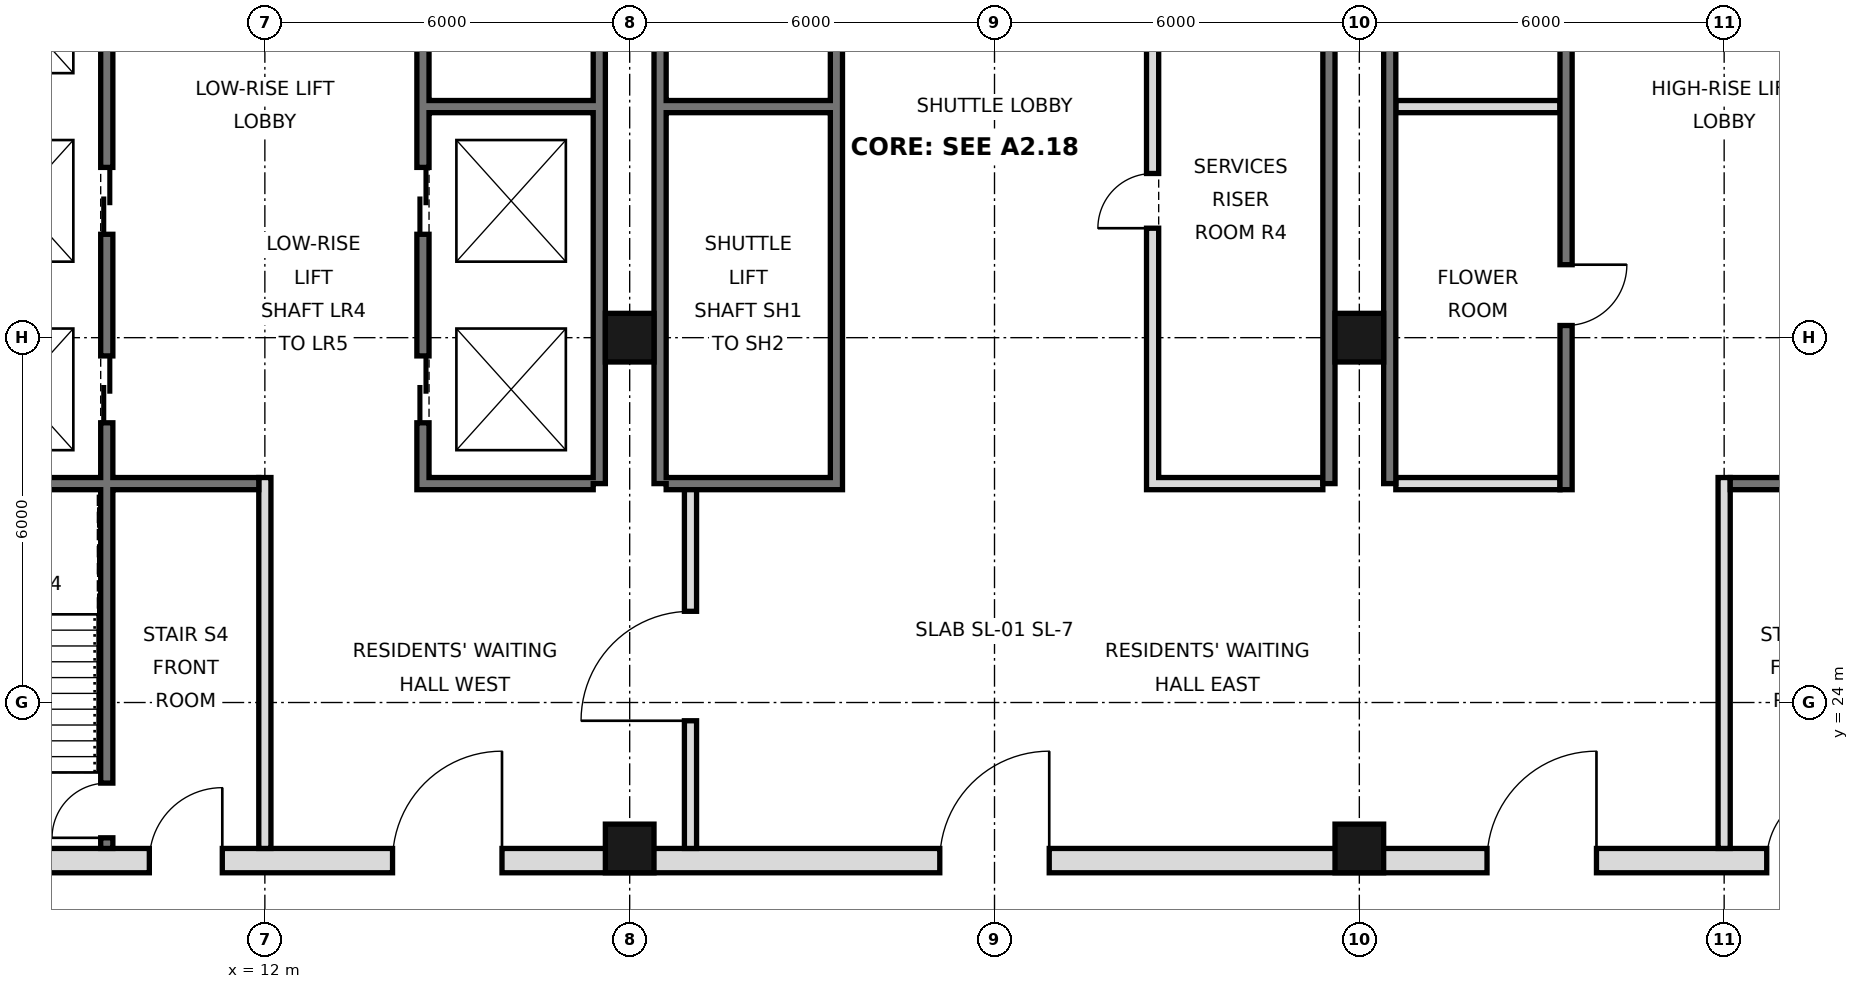
"""IFC4 building model, lengths in metres.
Left out: names, types, materials, properties, quantities, classifications, styles, units other than length and angle.
Written with IfcOpenShell. Run it as: python <this file> out.ifc"""

import sys

from ifc_helpers import new_model, si_unit, direction, frame, frame_2d, origin, origin_2d, place, context, subcontext, project, spatial, rectangle, hollow_rectangle, extrude, element, fill, save


model = new_model("IFC4")
c1 = context("Model", 3, precision=1e-05, world=origin(), true_north=direction((0.0, 1.0)))
c2 = subcontext(c1, "Body", "Model", "MODEL_VIEW")
j1 = project(units=[si_unit("LENGTHUNIT", "METRE"), si_unit("PLANEANGLEUNIT", "RADIAN")], contexts=[c1])
p1 = place(None, origin())
s1 = spatial("IfcSite", under=j1, at=p1, CompositionType="ELEMENT")
p2 = place(p1, origin())
s2 = spatial("IfcBuilding", under=s1, at=p2, CompositionType="ELEMENT")
p3 = place(p2, frame((0.0, 0.0, 71.4)))
s3 = spatial("IfcBuildingStorey", under=s2, at=p3, CompositionType="ELEMENT", Elevation=71.4)
for number, where, z_axis, x_axis in (
    (1, (18.0, 21.6, 0.0), (0.0, 0.0, 1.0), (1.0, 0.0, 0.0)),
    (2, (18.0, 30.0, 0.0), (0.0, 0.0, 1.0), (1.0, 0.0, 0.0)),
    (3, (30.0, 21.6, 0.0), (0.0, 0.0, 1.0), (1.0, 0.0, 0.0)),
    (4, (30.0, 30.0, 0.0), (0.0, 0.0, 1.0), (1.0, 0.0, 0.0)),
):
    element("IfcColumn", number, at=place(p3, frame(where, z_axis=z_axis, x_axis=x_axis)), inside=s3, PredefinedType="COLUMN", context=c2, shape_type="SweptSolid", body=[
        extrude(hollow_rectangle(XDim=0.8, YDim=0.8, WallThickness=0.06, at=origin_2d()), origin(), (0.0, 0.0, 1.0), 3.6),
    ])
for number, where, z_axis, x_axis in (
    (5, (17.5, 27.6, 0.0), (0.0, 0.0, 1.0), (0.0, 1.0, 0.0)),
    (6, (18.5, 27.6, 0.0), (0.0, 0.0, 1.0), (0.0, 1.0, 0.0)),
    (7, (29.5, 27.6, 0.0), (0.0, 0.0, 1.0), (0.0, 1.0, 0.0)),
    (8, (30.5, 27.6, 0.0), (0.0, 0.0, 1.0), (0.0, 1.0, 0.0)),
):
    element("IfcWall", number, at=place(p3, frame(where, z_axis=z_axis, x_axis=x_axis)), inside=s3, PredefinedType="SOLIDWALL", context=c2, shape_type="SweptSolid", body=[
        extrude(rectangle(XDim=17.5, YDim=0.2, at=frame_2d((8.75, 0.0))), origin(), (0.0, 0.0, 1.0), 3.42),
    ])
p4 = place(p3, frame((5.6, 21.4, 0.0), z_axis=(0.0, 0.0, 1.0), x_axis=(1.0, 0.0, 0.0)))
e9 = element("IfcWall", 9, at=p4, inside=s3, PredefinedType="SOLIDWALL", context=c2, shape_type="SweptSolid", body=[
    extrude(rectangle(XDim=36.8, YDim=0.4, at=frame_2d((18.4, 0.0))), origin(), (0.0, 0.0, 1.0), 3.42),
])
p5 = place(p4, frame((8.5, 0.0, 0.0)))
e10 = element("IfcOpeningElement", 10, at=p5, cuts=e9, PredefinedType="OPENING", context=c2, shape_type="SweptSolid", body=[
    extrude(rectangle(XDim=1.8, YDim=2.1, at=frame_2d((0.9, 1.05))), frame((0.0, 0.21, 0.0), z_axis=(0.0, -1.0, 0.0), x_axis=(1.0, 0.0, 0.0)), (0.0, 0.0, 1.0), 0.42),
])
p6 = place(p4, frame((17.5, 0.0, 0.0)))
e11 = element("IfcOpeningElement", 11, at=p6, cuts=e9, PredefinedType="OPENING", context=c2, shape_type="SweptSolid", body=[
    extrude(rectangle(XDim=1.8, YDim=2.1, at=frame_2d((0.9, 1.05))), frame((0.0, 0.21, 0.0), z_axis=(0.0, -1.0, 0.0), x_axis=(1.0, 0.0, 0.0)), (0.0, 0.0, 1.0), 0.42),
])
p7 = place(p4, frame((26.5, 0.0, 0.0)))
e12 = element("IfcOpeningElement", 12, at=p7, cuts=e9, PredefinedType="OPENING", context=c2, shape_type="SweptSolid", body=[
    extrude(rectangle(XDim=1.8, YDim=2.1, at=frame_2d((0.9, 1.05))), frame((0.0, 0.21, 0.0), z_axis=(0.0, -1.0, 0.0), x_axis=(1.0, 0.0, 0.0)), (0.0, 0.0, 1.0), 0.42),
])
p8 = place(p4, frame((4.5, 0.0, 0.0)))
e13 = element("IfcOpeningElement", 13, at=p8, cuts=e9, PredefinedType="OPENING", context=c2, shape_type="SweptSolid", body=[
    extrude(rectangle(XDim=1.2, YDim=2.1, at=frame_2d((0.6, 1.05))), frame((0.0, 0.21, 0.0), z_axis=(0.0, -1.0, 0.0), x_axis=(1.0, 0.0, 0.0)), (0.0, 0.0, 1.0), 0.42),
])
p9 = place(p4, frame((31.1, 0.0, 0.0)))
e14 = element("IfcOpeningElement", 14, at=p9, cuts=e9, PredefinedType="OPENING", context=c2, shape_type="SweptSolid", body=[
    extrude(rectangle(XDim=1.2, YDim=2.1, at=frame_2d((0.6, 1.05))), frame((0.0, 0.21, 0.0), z_axis=(0.0, -1.0, 0.0), x_axis=(1.0, 0.0, 0.0)), (0.0, 0.0, 1.0), 0.42),
])
p10 = place(p3, frame((19.0, 21.6, 0.0), z_axis=(0.0, 0.0, 1.0), x_axis=(0.0, 1.0, 0.0)))
e15 = element("IfcWall", 15, at=p10, inside=s3, PredefinedType="PARTITIONING", context=c2, shape_type="SweptSolid", body=[
    extrude(rectangle(XDim=6.0, YDim=0.2, at=frame_2d((3.0, 0.0))), origin(), (0.0, 0.0, 1.0), 3.42),
])
p11 = place(p10, frame((2.1, 0.0, 0.0)))
e16 = element("IfcOpeningElement", 16, at=p11, cuts=e15, PredefinedType="OPENING", context=c2, shape_type="SweptSolid", body=[
    extrude(rectangle(XDim=1.8, YDim=2.1, at=frame_2d((0.9, 1.05))), frame((0.0, 0.11, 0.0), z_axis=(0.0, -1.0, 0.0), x_axis=(1.0, 0.0, 0.0)), (0.0, 0.0, 1.0), 0.22),
])
p12 = place(p3, frame((12.0, 21.6, 0.0), z_axis=(0.0, 0.0, 1.0), x_axis=(0.0, 1.0, 0.0)))
e17 = element("IfcWall", 17, at=p12, inside=s3, PredefinedType="PARTITIONING", context=c2, shape_type="SweptSolid", body=[
    extrude(rectangle(XDim=6.1, YDim=0.2, at=frame_2d((3.05, 0.0))), origin(), (0.0, 0.0, 1.0), 3.42),
])
p13 = place(p3, frame((14.6, 27.5, 0.0), z_axis=(0.0, 0.0, 1.0), x_axis=(0.0, 1.0, 0.0)))
e18 = element("IfcWall", 18, at=p13, inside=s3, PredefinedType="SOLIDWALL", context=c2, shape_type="SweptSolid", body=[
    extrude(rectangle(XDim=17.5, YDim=0.2, at=frame_2d((8.75, 0.0))), origin(), (0.0, 0.0, 1.0), 3.42),
])
p14 = place(p13, frame((1.1, 0.0, 0.0)))
e19 = element("IfcOpeningElement", 19, at=p14, cuts=e18, PredefinedType="OPENING", context=c2, shape_type="SweptSolid", body=[
    extrude(rectangle(XDim=1.1, YDim=2.1, at=frame_2d((0.55, 1.05))), frame((0.0, 0.11, 0.0), z_axis=(0.0, -1.0, 0.0), x_axis=(1.0, 0.0, 0.0)), (0.0, 0.0, 1.0), 0.22),
])
p15 = place(p13, frame((4.2, 0.0, 0.0)))
e20 = element("IfcOpeningElement", 20, at=p15, cuts=e18, PredefinedType="OPENING", context=c2, shape_type="SweptSolid", body=[
    extrude(rectangle(XDim=1.1, YDim=2.1, at=frame_2d((0.55, 1.05))), frame((0.0, 0.11, 0.0), z_axis=(0.0, -1.0, 0.0), x_axis=(1.0, 0.0, 0.0)), (0.0, 0.0, 1.0), 0.22),
])
p16 = place(p13, frame((15.4, 0.0, 0.0)))
e21 = element("IfcOpeningElement", 21, at=p16, cuts=e18, PredefinedType="OPENING", context=c2, shape_type="SweptSolid", body=[
    extrude(rectangle(XDim=1.1, YDim=2.1, at=frame_2d((0.55, 1.05))), frame((0.0, 0.11, 0.0), z_axis=(0.0, -1.0, 0.0), x_axis=(1.0, 0.0, 0.0)), (0.0, 0.0, 1.0), 0.22),
])
p17 = place(p13, frame((9.9, 0.0, 0.0)))
e22 = element("IfcOpeningElement", 22, at=p17, cuts=e18, PredefinedType="OPENING", context=c2, shape_type="SweptSolid", body=[
    extrude(rectangle(XDim=0.9, YDim=2.1, at=frame_2d((0.45, 1.05))), frame((0.0, 0.11, 0.0), z_axis=(0.0, -1.0, 0.0), x_axis=(1.0, 0.0, 0.0)), (0.0, 0.0, 1.0), 0.22),
])
p18 = place(p3, frame((21.4, 27.5, 0.0), z_axis=(0.0, 0.0, 1.0), x_axis=(0.0, 1.0, 0.0)))
e23 = element("IfcWall", 23, at=p18, inside=s3, PredefinedType="SOLIDWALL", context=c2, shape_type="SweptSolid", body=[
    extrude(rectangle(XDim=17.5, YDim=0.2, at=frame_2d((8.75, 0.0))), origin(), (0.0, 0.0, 1.0), 3.42),
])
p19 = place(p18, frame((9.8, 0.0, 0.0)))
e24 = element("IfcOpeningElement", 24, at=p19, cuts=e23, PredefinedType="OPENING", context=c2, shape_type="SweptSolid", body=[
    extrude(rectangle(XDim=1.0, YDim=2.1, at=frame_2d((0.5, 1.05))), frame((0.0, 0.11, 0.0), z_axis=(0.0, -1.0, 0.0), x_axis=(1.0, 0.0, 0.0)), (0.0, 0.0, 1.0), 0.22),
])
p20 = place(p18, frame((7.4, 0.0, 0.0)))
e25 = element("IfcOpeningElement", 25, at=p20, cuts=e23, PredefinedType="OPENING", context=c2, shape_type="SweptSolid", body=[
    extrude(rectangle(XDim=0.9, YDim=2.1, at=frame_2d((0.45, 1.05))), frame((0.0, 0.11, 0.0), z_axis=(0.0, -1.0, 0.0), x_axis=(1.0, 0.0, 0.0)), (0.0, 0.0, 1.0), 0.22),
])
p21 = place(p3, frame((26.6, 27.5, 0.0), z_axis=(0.0, 0.0, 1.0), x_axis=(0.0, 1.0, 0.0)))
e26 = element("IfcWall", 26, at=p21, inside=s3, PredefinedType="SOLIDWALL", context=c2, shape_type="SweptSolid", body=[
    extrude(rectangle(XDim=17.5, YDim=0.2, at=frame_2d((8.75, 0.0))), origin(), (0.0, 0.0, 1.0), 3.42),
])
p22 = place(p21, frame((4.3, 0.0, 0.0)))
e27 = element("IfcOpeningElement", 27, at=p22, cuts=e26, PredefinedType="OPENING", context=c2, shape_type="SweptSolid", body=[
    extrude(rectangle(XDim=0.9, YDim=2.1, at=frame_2d((0.45, 1.05))), frame((0.0, 0.11, 0.0), z_axis=(0.0, -1.0, 0.0), x_axis=(1.0, 0.0, 0.0)), (0.0, 0.0, 1.0), 0.22),
])
p23 = place(p21, frame((10.35, 0.0, 0.0)))
e28 = element("IfcOpeningElement", 28, at=p23, cuts=e26, PredefinedType="OPENING", context=c2, shape_type="SweptSolid", body=[
    extrude(rectangle(XDim=1.0, YDim=2.1, at=frame_2d((0.5, 1.05))), frame((0.0, 0.11, 0.0), z_axis=(0.0, -1.0, 0.0), x_axis=(1.0, 0.0, 0.0)), (0.0, 0.0, 1.0), 0.22),
])
p24 = place(p3, frame((33.4, 27.5, 0.0), z_axis=(0.0, 0.0, 1.0), x_axis=(0.0, 1.0, 0.0)))
e29 = element("IfcWall", 29, at=p24, inside=s3, PredefinedType="SOLIDWALL", context=c2, shape_type="SweptSolid", body=[
    extrude(rectangle(XDim=17.5, YDim=0.2, at=frame_2d((8.75, 0.0))), origin(), (0.0, 0.0, 1.0), 3.42),
])
p25 = place(p24, frame((15.4, 0.0, 0.0)))
e30 = element("IfcOpeningElement", 30, at=p25, cuts=e29, PredefinedType="OPENING", context=c2, shape_type="SweptSolid", body=[
    extrude(rectangle(XDim=1.1, YDim=2.1, at=frame_2d((0.55, 1.05))), frame((0.0, 0.11, 0.0), z_axis=(0.0, -1.0, 0.0), x_axis=(1.0, 0.0, 0.0)), (0.0, 0.0, 1.0), 0.22),
])
p26 = place(p24, frame((2.7, 0.0, 0.0)))
e31 = element("IfcOpeningElement", 31, at=p26, cuts=e29, PredefinedType="OPENING", context=c2, shape_type="SweptSolid", body=[
    extrude(rectangle(XDim=1.0, YDim=2.1, at=frame_2d((0.5, 1.05))), frame((0.0, 0.11, 0.0), z_axis=(0.0, -1.0, 0.0), x_axis=(1.0, 0.0, 0.0)), (0.0, 0.0, 1.0), 0.22),
])
p27 = place(p24, frame((9.9, 0.0, 0.0)))
e32 = element("IfcOpeningElement", 32, at=p27, cuts=e29, PredefinedType="OPENING", context=c2, shape_type="SweptSolid", body=[
    extrude(rectangle(XDim=0.9, YDim=2.1, at=frame_2d((0.45, 1.05))), frame((0.0, 0.11, 0.0), z_axis=(0.0, -1.0, 0.0), x_axis=(1.0, 0.0, 0.0)), (0.0, 0.0, 1.0), 0.22),
])
p28 = place(p3, frame((36.0, 21.6, 0.0), z_axis=(0.0, 0.0, 1.0), x_axis=(0.0, 1.0, 0.0)))
e33 = element("IfcWall", 33, at=p28, inside=s3, PredefinedType="PARTITIONING", context=c2, shape_type="SweptSolid", body=[
    extrude(rectangle(XDim=6.1, YDim=0.2, at=frame_2d((3.05, 0.0))), origin(), (0.0, 0.0, 1.0), 3.42),
])
p29 = place(p3, frame((9.4, 21.6, 0.0), z_axis=(0.0, 0.0, 1.0), x_axis=(0.0, 1.0, 0.0)))
e34 = element("IfcWall", 34, at=p29, inside=s3, PredefinedType="SOLIDWALL", context=c2, shape_type="SweptSolid", body=[
    extrude(rectangle(XDim=23.4, YDim=0.2, at=frame_2d((11.7, 0.0))), origin(), (0.0, 0.0, 1.0), 3.42),
])
p30 = place(p29, frame((7.0, 0.0, 0.0)))
e35 = element("IfcOpeningElement", 35, at=p30, cuts=e34, PredefinedType="OPENING", context=c2, shape_type="SweptSolid", body=[
    extrude(rectangle(XDim=1.1, YDim=2.1, at=frame_2d((0.55, 1.05))), frame((0.0, 0.11, 0.0), z_axis=(0.0, -1.0, 0.0), x_axis=(1.0, 0.0, 0.0)), (0.0, 0.0, 1.0), 0.22),
])
p31 = place(p29, frame((10.1, 0.0, 0.0)))
e36 = element("IfcOpeningElement", 36, at=p31, cuts=e34, PredefinedType="OPENING", context=c2, shape_type="SweptSolid", body=[
    extrude(rectangle(XDim=1.1, YDim=2.1, at=frame_2d((0.55, 1.05))), frame((0.0, 0.11, 0.0), z_axis=(0.0, -1.0, 0.0), x_axis=(1.0, 0.0, 0.0)), (0.0, 0.0, 1.0), 0.22),
])
p32 = place(p29, frame((13.2, 0.0, 0.0)))
e37 = element("IfcOpeningElement", 37, at=p32, cuts=e34, PredefinedType="OPENING", context=c2, shape_type="SweptSolid", body=[
    extrude(rectangle(XDim=1.1, YDim=2.1, at=frame_2d((0.55, 1.05))), frame((0.0, 0.11, 0.0), z_axis=(0.0, -1.0, 0.0), x_axis=(1.0, 0.0, 0.0)), (0.0, 0.0, 1.0), 0.22),
])
p33 = place(p29, frame((15.7, 0.0, 0.0)))
e38 = element("IfcOpeningElement", 38, at=p33, cuts=e34, PredefinedType="OPENING", context=c2, shape_type="SweptSolid", body=[
    extrude(rectangle(XDim=1.0, YDim=2.1, at=frame_2d((0.5, 1.05))), frame((0.0, 0.11, 0.0), z_axis=(0.0, -1.0, 0.0), x_axis=(1.0, 0.0, 0.0)), (0.0, 0.0, 1.0), 0.22),
])
p34 = place(p29, frame((0.175, 0.0, 0.0)))
e39 = element("IfcOpeningElement", 39, at=p34, cuts=e34, PredefinedType="OPENING", context=c2, shape_type="SweptSolid", body=[
    extrude(rectangle(XDim=0.9, YDim=2.1, at=frame_2d((0.45, 1.05))), frame((0.0, 0.11, 0.0), z_axis=(0.0, -1.0, 0.0), x_axis=(1.0, 0.0, 0.0)), (0.0, 0.0, 1.0), 0.22),
])
for number, where, z_axis, x_axis in (
    (40, (14.7, 27.6, 0.0), (0.0, 0.0, 1.0), (1.0, 0.0, 0.0)),
    (41, (18.6, 27.6, 0.0), (0.0, 0.0, 1.0), (1.0, 0.0, 0.0)),
    (42, (26.7, 27.6, 0.0), (0.0, 0.0, 1.0), (1.0, 0.0, 0.0)),
):
    element("IfcWall", number, at=place(p3, frame(where, z_axis=z_axis, x_axis=x_axis)), inside=s3, PredefinedType="SOLIDWALL", context=c2, shape_type="SweptSolid", body=[
        extrude(rectangle(XDim=2.7, YDim=0.2, at=frame_2d((1.35, 0.0))), origin(), (0.0, 0.0, 1.0), 3.42),
    ])
p35 = place(p3, frame((30.6, 27.6, 0.0), z_axis=(0.0, 0.0, 1.0), x_axis=(1.0, 0.0, 0.0)))
e43 = element("IfcWall", 43, at=p35, inside=s3, PredefinedType="PARTITIONING", context=c2, shape_type="SweptSolid", body=[
    extrude(rectangle(XDim=2.7, YDim=0.2, at=frame_2d((1.35, 0.0))), origin(), (0.0, 0.0, 1.0), 3.42),
])
for number, where, z_axis, x_axis in (
    (44, (36.1, 27.6, 0.0), (0.0, 0.0, 1.0), (1.0, 0.0, 0.0)),
    (45, (6.6, 27.6, 0.0), (0.0, 0.0, 1.0), (1.0, 0.0, 0.0)),
):
    element("IfcWall", number, at=place(p3, frame(where, z_axis=z_axis, x_axis=x_axis)), inside=s3, PredefinedType="SOLIDWALL", context=c2, shape_type="SweptSolid", body=[
        extrude(rectangle(XDim=5.3, YDim=0.2, at=frame_2d((2.65, 0.0))), origin(), (0.0, 0.0, 1.0), 3.42),
    ])
for number, where, z_axis, x_axis in (
    (46, (14.7, 33.8, 0.0), (0.0, 0.0, 1.0), (1.0, 0.0, 0.0)),
    (47, (18.6, 33.8, 0.0), (0.0, 0.0, 1.0), (1.0, 0.0, 0.0)),
    (48, (30.6, 33.8, 0.0), (0.0, 0.0, 1.0), (1.0, 0.0, 0.0)),
):
    element("IfcWall", number, at=place(p3, frame(where, z_axis=z_axis, x_axis=x_axis)), inside=s3, PredefinedType="SOLIDWALL", context=c2, shape_type="SweptSolid", body=[
        extrude(rectangle(XDim=2.7, YDim=0.2, at=frame_2d((1.35, 0.0))), origin(), (0.0, 0.0, 1.0), 3.42),
    ])
p36 = place(p5, frame((1.8, 0.0, 0.0), z_axis=(0.0, 0.0, 1.0), x_axis=(-1.0, 0.0, 0.0)))
e49 = element("IfcDoor", 49, at=p36, inside=s3, OperationType="SINGLE_SWING_LEFT", PredefinedType="DOOR", context=c2, shape_type="SweptSolid", body=[
    extrude(rectangle(XDim=1.8, YDim=2.1, at=frame_2d((0.9, 1.05))), frame((0.0, 0.025, 0.0), z_axis=(0.0, -1.0, 0.0), x_axis=(1.0, 0.0, 0.0)), (0.0, 0.0, 1.0), 0.05),
])
fill(e10, e49)
p37 = place(p11, origin())
e50 = element("IfcDoor", 50, at=p37, inside=s3, OperationType="SINGLE_SWING_LEFT", PredefinedType="DOOR", context=c2, shape_type="SweptSolid", body=[
    extrude(rectangle(XDim=1.8, YDim=2.1, at=frame_2d((0.9, 1.05))), frame((0.0, 0.025, 0.0), z_axis=(0.0, -1.0, 0.0), x_axis=(1.0, 0.0, 0.0)), (0.0, 0.0, 1.0), 0.05),
])
fill(e16, e50)
p38 = place(p6, frame((1.8, 0.0, 0.0), z_axis=(0.0, 0.0, 1.0), x_axis=(-1.0, 0.0, 0.0)))
e51 = element("IfcDoor", 51, at=p38, inside=s3, OperationType="SINGLE_SWING_LEFT", PredefinedType="DOOR", context=c2, shape_type="SweptSolid", body=[
    extrude(rectangle(XDim=1.8, YDim=2.1, at=frame_2d((0.9, 1.05))), frame((0.0, 0.025, 0.0), z_axis=(0.0, -1.0, 0.0), x_axis=(1.0, 0.0, 0.0)), (0.0, 0.0, 1.0), 0.05),
])
fill(e11, e51)
p39 = place(p7, frame((1.8, 0.0, 0.0), z_axis=(0.0, 0.0, 1.0), x_axis=(-1.0, 0.0, 0.0)))
e52 = element("IfcDoor", 52, at=p39, inside=s3, OperationType="SINGLE_SWING_LEFT", PredefinedType="DOOR", context=c2, shape_type="SweptSolid", body=[
    extrude(rectangle(XDim=1.8, YDim=2.1, at=frame_2d((0.9, 1.05))), frame((0.0, 0.025, 0.0), z_axis=(0.0, -1.0, 0.0), x_axis=(1.0, 0.0, 0.0)), (0.0, 0.0, 1.0), 0.05),
])
fill(e12, e52)
p40 = place(p8, frame((1.2, 0.0, 0.0), z_axis=(0.0, 0.0, 1.0), x_axis=(-1.0, 0.0, 0.0)))
e53 = element("IfcDoor", 53, at=p40, inside=s3, OperationType="SINGLE_SWING_LEFT", PredefinedType="DOOR", context=c2, shape_type="SweptSolid", body=[
    extrude(rectangle(XDim=1.2, YDim=2.1, at=frame_2d((0.6, 1.05))), frame((0.0, 0.025, 0.0), z_axis=(0.0, -1.0, 0.0), x_axis=(1.0, 0.0, 0.0)), (0.0, 0.0, 1.0), 0.05),
])
fill(e13, e53)
p41 = place(p9, frame((1.2, 0.0, 0.0), z_axis=(0.0, 0.0, 1.0), x_axis=(-1.0, 0.0, 0.0)))
e54 = element("IfcDoor", 54, at=p41, inside=s3, OperationType="SINGLE_SWING_LEFT", PredefinedType="DOOR", context=c2, shape_type="SweptSolid", body=[
    extrude(rectangle(XDim=1.2, YDim=2.1, at=frame_2d((0.6, 1.05))), frame((0.0, 0.025, 0.0), z_axis=(0.0, -1.0, 0.0), x_axis=(1.0, 0.0, 0.0)), (0.0, 0.0, 1.0), 0.05),
])
fill(e14, e54)
p42 = place(p14, origin())
e55 = element("IfcDoor", 55, at=p42, inside=s3, OperationType="DOUBLE_DOOR_SLIDING", PredefinedType="DOOR", context=c2, shape_type="SweptSolid", body=[
    extrude(rectangle(XDim=1.1, YDim=2.1, at=frame_2d((0.55, 1.05))), frame((0.0, 0.025, 0.0), z_axis=(0.0, -1.0, 0.0), x_axis=(1.0, 0.0, 0.0)), (0.0, 0.0, 1.0), 0.05),
])
fill(e19, e55)
p43 = place(p15, origin())
e56 = element("IfcDoor", 56, at=p43, inside=s3, OperationType="DOUBLE_DOOR_SLIDING", PredefinedType="DOOR", context=c2, shape_type="SweptSolid", body=[
    extrude(rectangle(XDim=1.1, YDim=2.1, at=frame_2d((0.55, 1.05))), frame((0.0, 0.025, 0.0), z_axis=(0.0, -1.0, 0.0), x_axis=(1.0, 0.0, 0.0)), (0.0, 0.0, 1.0), 0.05),
])
fill(e20, e56)
p44 = place(p30, origin())
e57 = element("IfcDoor", 57, at=p44, inside=s3, OperationType="DOUBLE_DOOR_SLIDING", PredefinedType="DOOR", context=c2, shape_type="SweptSolid", body=[
    extrude(rectangle(XDim=1.1, YDim=2.1, at=frame_2d((0.55, 1.05))), frame((0.0, 0.025, 0.0), z_axis=(0.0, -1.0, 0.0), x_axis=(1.0, 0.0, 0.0)), (0.0, 0.0, 1.0), 0.05),
])
fill(e35, e57)
p45 = place(p31, origin())
e58 = element("IfcDoor", 58, at=p45, inside=s3, OperationType="DOUBLE_DOOR_SLIDING", PredefinedType="DOOR", context=c2, shape_type="SweptSolid", body=[
    extrude(rectangle(XDim=1.1, YDim=2.1, at=frame_2d((0.55, 1.05))), frame((0.0, 0.025, 0.0), z_axis=(0.0, -1.0, 0.0), x_axis=(1.0, 0.0, 0.0)), (0.0, 0.0, 1.0), 0.05),
])
fill(e36, e58)
p46 = place(p26, origin())
e59 = element("IfcDoor", 59, at=p46, inside=s3, OperationType="SINGLE_SWING_RIGHT", PredefinedType="DOOR", context=c2, shape_type="SweptSolid", body=[
    extrude(rectangle(XDim=1.0, YDim=2.1, at=frame_2d((0.5, 1.05))), frame((0.0, 0.025, 0.0), z_axis=(0.0, -1.0, 0.0), x_axis=(1.0, 0.0, 0.0)), (0.0, 0.0, 1.0), 0.05),
])
fill(e31, e59)
p47 = place(p34, origin())
e60 = element("IfcDoor", 60, at=p47, inside=s3, OperationType="SINGLE_SWING_LEFT", PredefinedType="DOOR", context=c2, shape_type="SweptSolid", body=[
    extrude(rectangle(XDim=0.9, YDim=2.1, at=frame_2d((0.45, 1.05))), frame((0.0, 0.025, 0.0), z_axis=(0.0, -1.0, 0.0), x_axis=(1.0, 0.0, 0.0)), (0.0, 0.0, 1.0), 0.05),
])
fill(e39, e60)
p48 = place(p22, origin())
e61 = element("IfcDoor", 61, at=p48, inside=s3, OperationType="SINGLE_SWING_LEFT", PredefinedType="DOOR", context=c2, shape_type="SweptSolid", body=[
    extrude(rectangle(XDim=0.9, YDim=2.1, at=frame_2d((0.45, 1.05))), frame((0.0, 0.025, 0.0), z_axis=(0.0, -1.0, 0.0), x_axis=(1.0, 0.0, 0.0)), (0.0, 0.0, 1.0), 0.05),
])
fill(e27, e61)
save(model, sys.argv[1])
